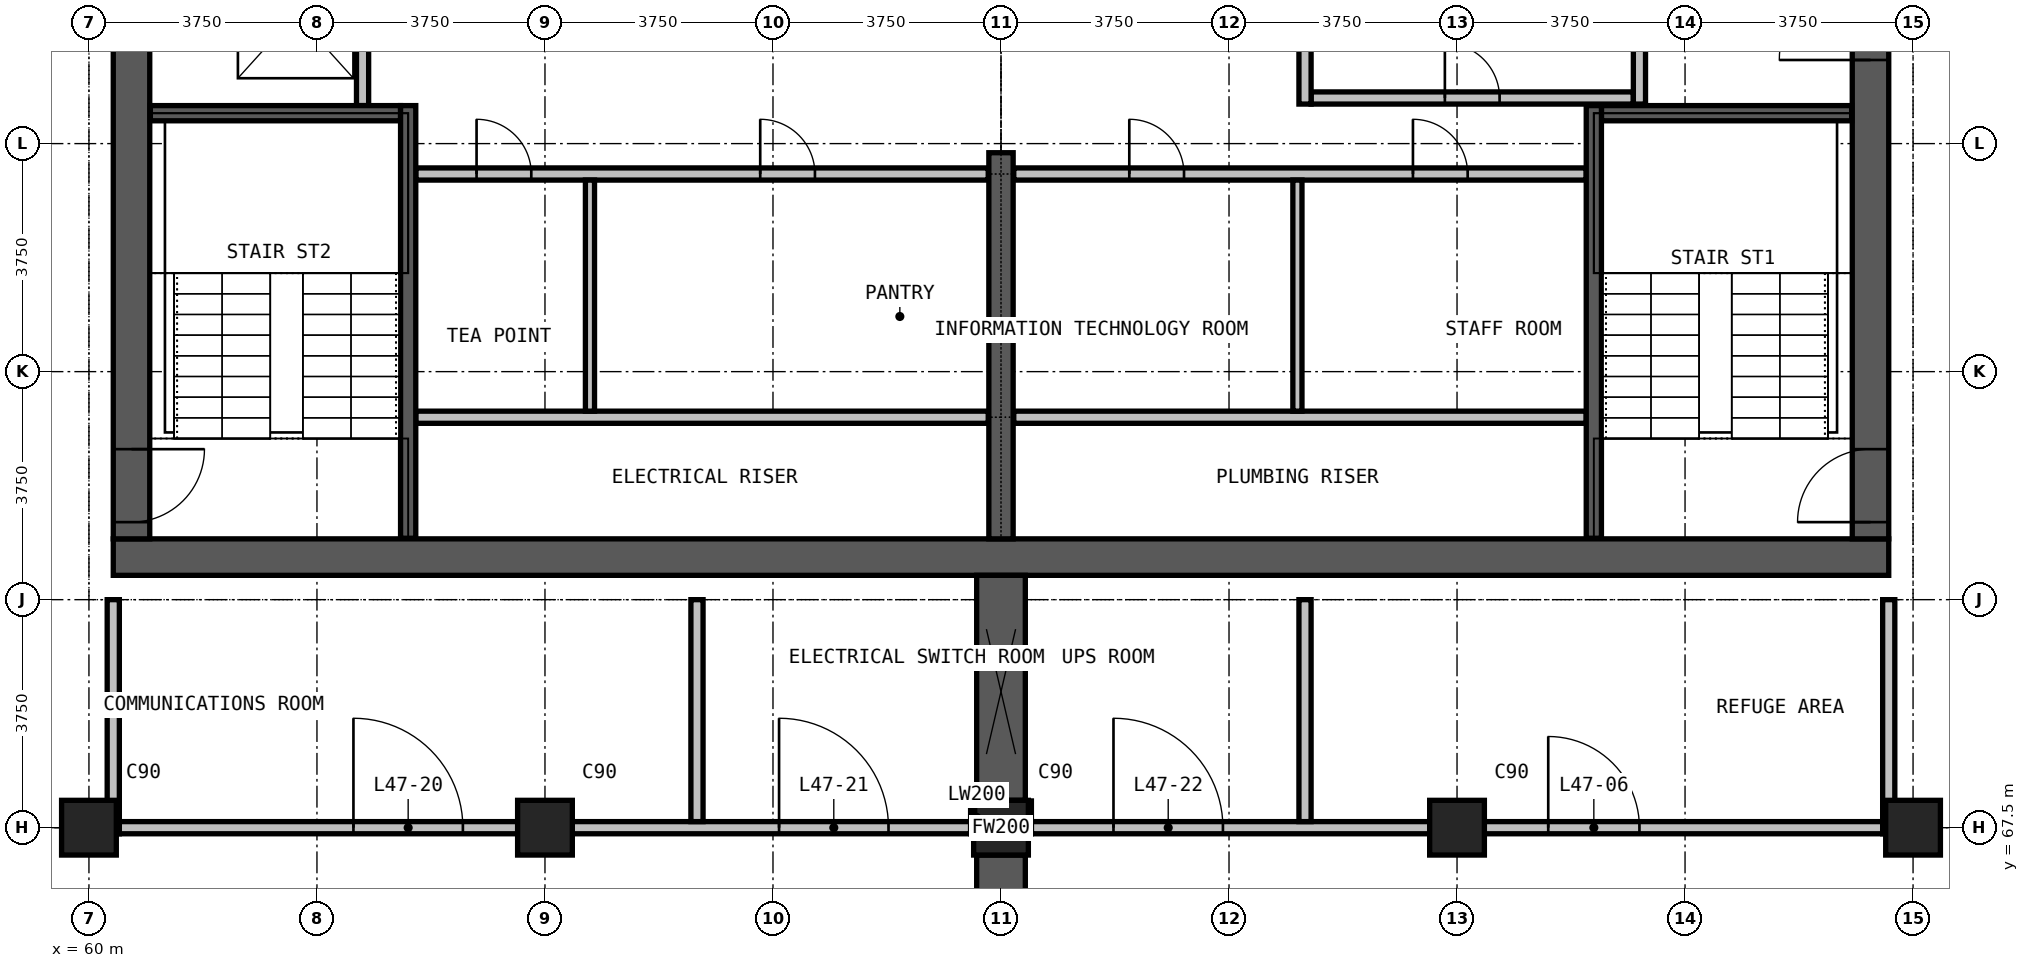
"""IFC4 building model, lengths in metres.
Left out: names, types, materials, properties, quantities, classifications, styles, units other than length and angle.
Written with IfcOpenShell. Run it as: python <this file> out.ifc"""

import sys

from ifc_helpers import new_model, si_unit, direction, frame, frame_2d, origin, origin_2d, place, context, subcontext, project, spatial, rectangle, extrude, element, fill, save


model = new_model("IFC4")
c1 = context("Model", 3, precision=1e-05, world=origin(), true_north=direction((0.0, 1.0)))
c2 = subcontext(c1, "Body", "Model", "MODEL_VIEW")
j1 = project(units=[si_unit("LENGTHUNIT", "METRE"), si_unit("PLANEANGLEUNIT", "RADIAN")], contexts=[c1])
p1 = place(None, origin())
s1 = spatial("IfcSite", under=j1, at=p1, CompositionType="ELEMENT")
p2 = place(p1, origin())
s2 = spatial("IfcBuilding", under=s1, at=p2, CompositionType="ELEMENT")
p3 = place(p2, frame((0.0, 0.0, 183.7)))
s3 = spatial("IfcBuildingStorey", under=s2, at=p3, CompositionType="ELEMENT", Elevation=183.7)
for number, where, z_axis, x_axis in (
    (1, (60.0, 67.5, 0.0), (0.0, 0.0, 1.0), (1.0, 0.0, 0.0)),
    (2, (67.5, 67.5, 0.0), (0.0, 0.0, 1.0), (1.0, 0.0, 0.0)),
    (3, (75.0, 67.5, 0.0), (0.0, 0.0, 1.0), (1.0, 0.0, 0.0)),
    (4, (82.5, 67.5, 0.0), (0.0, 0.0, 1.0), (1.0, 0.0, 0.0)),
    (5, (90.0, 67.5, 0.0), (0.0, 0.0, 1.0), (1.0, 0.0, 0.0)),
):
    element("IfcColumn", number, at=place(p3, frame(where, z_axis=z_axis, x_axis=x_axis)), inside=s3, PredefinedType="COLUMN", context=c2, shape_type="SweptSolid", body=[
        extrude(rectangle(XDim=0.9, YDim=0.9, at=origin_2d()), origin(), (0.0, 0.0, 1.0), 5.0),
    ])
p4 = place(p3, frame((60.4, 71.95, 0.0), z_axis=(0.0, 0.0, 1.0), x_axis=(1.0, 0.0, 0.0)))
e6 = element("IfcWall", 6, at=p4, inside=s3, PredefinedType="SHEAR", context=c2, shape_type="SweptSolid", body=[
    extrude(rectangle(XDim=29.2, YDim=0.6, at=frame_2d((14.6, 0.0))), origin(), (0.0, 0.0, 1.0), 5.0),
])
p5 = place(p3, frame((89.3, 72.25, 0.0), z_axis=(0.0, 0.0, 1.0), x_axis=(0.0, 1.0, 0.0)))
e7 = element("IfcWall", 7, at=p5, inside=s3, PredefinedType="SHEAR", context=c2, shape_type="SweptSolid", body=[
    extrude(rectangle(XDim=20.5, YDim=0.6, at=frame_2d((10.25, 0.0))), origin(), (0.0, 0.0, 1.0), 5.0),
])
p6 = place(p5, frame((0.275, 0.0, 0.0)))
e8 = element("IfcOpeningElement", 8, at=p6, cuts=e7, PredefinedType="OPENING", context=c2, shape_type="SweptSolid", body=[
    extrude(rectangle(XDim=1.2, YDim=2.2, at=frame_2d((0.6, 1.1))), frame((0.0, 0.31, 0.0), z_axis=(0.0, -1.0, 0.0), x_axis=(1.0, 0.0, 0.0)), (0.0, 0.0, 1.0), 0.62),
])
p7 = place(p5, frame((13.775, 0.0, 0.0)))
e9 = element("IfcOpeningElement", 9, at=p7, cuts=e7, PredefinedType="OPENING", context=c2, shape_type="SweptSolid", body=[
    extrude(rectangle(XDim=1.2, YDim=2.2, at=frame_2d((0.6, 1.1))), frame((0.0, 0.31, 0.0), z_axis=(0.0, -1.0, 0.0), x_axis=(1.0, 0.0, 0.0)), (0.0, 0.0, 1.0), 0.62),
])
p8 = place(p5, frame((7.875, 0.0, 0.0)))
e10 = element("IfcOpeningElement", 10, at=p8, cuts=e7, PredefinedType="OPENING", context=c2, shape_type="SweptSolid", body=[
    extrude(rectangle(XDim=1.5, YDim=2.2, at=frame_2d((0.75, 1.1))), frame((0.0, 0.31, 0.0), z_axis=(0.0, -1.0, 0.0), x_axis=(1.0, 0.0, 0.0)), (0.0, 0.0, 1.0), 0.62),
])
p9 = place(p3, frame((60.7, 92.75, 0.0), z_axis=(0.0, 0.0, 1.0), x_axis=(0.0, -1.0, 0.0)))
e11 = element("IfcWall", 11, at=p9, inside=s3, PredefinedType="SHEAR", context=c2, shape_type="SweptSolid", body=[
    extrude(rectangle(XDim=20.5, YDim=0.6, at=frame_2d((10.25, 0.0))), origin(), (0.0, 0.0, 1.0), 5.0),
])
p10 = place(p9, frame((19.025, 0.0, 0.0)))
e12 = element("IfcOpeningElement", 12, at=p10, cuts=e11, PredefinedType="OPENING", context=c2, shape_type="SweptSolid", body=[
    extrude(rectangle(XDim=1.2, YDim=2.2, at=frame_2d((0.6, 1.1))), frame((0.0, 0.31, 0.0), z_axis=(0.0, -1.0, 0.0), x_axis=(1.0, 0.0, 0.0)), (0.0, 0.0, 1.0), 0.62),
])
p11 = place(p9, frame((8.025, 0.0, 0.0)))
e13 = element("IfcOpeningElement", 13, at=p11, cuts=e11, PredefinedType="OPENING", context=c2, shape_type="SweptSolid", body=[
    extrude(rectangle(XDim=1.2, YDim=2.2, at=frame_2d((0.6, 1.1))), frame((0.0, 0.31, 0.0), z_axis=(0.0, -1.0, 0.0), x_axis=(1.0, 0.0, 0.0)), (0.0, 0.0, 1.0), 0.62),
])
p12 = place(p3, frame((75.0, 72.25, 0.0), z_axis=(0.0, 0.0, 1.0), x_axis=(0.0, 1.0, 0.0)))
e14 = element("IfcWall", 14, at=p12, inside=s3, PredefinedType="SHEAR", context=c2, shape_type="SweptSolid", body=[
    extrude(rectangle(XDim=6.35, YDim=0.4, at=frame_2d((3.175, 0.0))), origin(), (0.0, 0.0, 1.0), 5.0),
])
p13 = place(p3, frame((75.0, 60.45, 0.0), z_axis=(0.0, 0.0, 1.0), x_axis=(0.0, 1.0, 0.0)))
e15 = element("IfcWall", 15, at=p13, inside=s3, PredefinedType="SHEAR", context=c2, shape_type="SweptSolid", body=[
    extrude(rectangle(XDim=6.6, YDim=0.8, at=frame_2d((3.3, 0.0))), origin(), (0.0, 0.0, 1.0), 4.7),
])
p14 = place(p3, frame((75.0, 67.95, 0.0), z_axis=(0.0, 0.0, 1.0), x_axis=(0.0, 1.0, 0.0)))
e16 = element("IfcWall", 16, at=p14, inside=s3, PredefinedType="SHEAR", context=c2, shape_type="SweptSolid", body=[
    extrude(rectangle(XDim=3.7, YDim=0.8, at=frame_2d((1.85, 0.0))), origin(), (0.0, 0.0, 1.0), 4.7),
])
p15 = place(p3, frame((60.5, 67.5, 0.0), z_axis=(0.0, 0.0, 1.0), x_axis=(1.0, 0.0, 0.0)))
e17 = element("IfcWall", 17, at=p15, inside=s3, PredefinedType="PARTITIONING", context=c2, shape_type="SweptSolid", body=[
    extrude(rectangle(XDim=14.0, YDim=0.2, at=frame_2d((7.0, 0.0))), origin(), (0.0, 0.0, 1.0), 4.7),
])
p16 = place(p15, frame((3.85, 0.0, 0.0)))
e18 = element("IfcOpeningElement", 18, at=p16, cuts=e17, PredefinedType="OPENING", context=c2, shape_type="SweptSolid", body=[
    extrude(rectangle(XDim=1.8, YDim=2.4, at=frame_2d((0.9, 1.2))), frame((0.0, 0.11, 0.0), z_axis=(0.0, -1.0, 0.0), x_axis=(1.0, 0.0, 0.0)), (0.0, 0.0, 1.0), 0.22),
])
p17 = place(p15, frame((10.85, 0.0, 0.0)))
e19 = element("IfcOpeningElement", 19, at=p17, cuts=e17, PredefinedType="OPENING", context=c2, shape_type="SweptSolid", body=[
    extrude(rectangle(XDim=1.8, YDim=2.4, at=frame_2d((0.9, 1.2))), frame((0.0, 0.11, 0.0), z_axis=(0.0, -1.0, 0.0), x_axis=(1.0, 0.0, 0.0)), (0.0, 0.0, 1.0), 0.22),
])
p18 = place(p3, frame((75.5, 67.5, 0.0), z_axis=(0.0, 0.0, 1.0), x_axis=(1.0, 0.0, 0.0)))
e20 = element("IfcWall", 20, at=p18, inside=s3, PredefinedType="PARTITIONING", context=c2, shape_type="SweptSolid", body=[
    extrude(rectangle(XDim=14.0, YDim=0.2, at=frame_2d((7.0, 0.0))), origin(), (0.0, 0.0, 1.0), 4.7),
])
p19 = place(p18, frame((8.5, 0.0, 0.0)))
e21 = element("IfcOpeningElement", 21, at=p19, cuts=e20, PredefinedType="OPENING", context=c2, shape_type="SweptSolid", body=[
    extrude(rectangle(XDim=1.5, YDim=2.2, at=frame_2d((0.75, 1.1))), frame((0.0, 0.11, 0.0), z_axis=(0.0, -1.0, 0.0), x_axis=(1.0, 0.0, 0.0)), (0.0, 0.0, 1.0), 0.22),
])
p20 = place(p18, frame((1.35, 0.0, 0.0)))
e22 = element("IfcOpeningElement", 22, at=p20, cuts=e20, PredefinedType="OPENING", context=c2, shape_type="SweptSolid", body=[
    extrude(rectangle(XDim=1.8, YDim=2.4, at=frame_2d((0.9, 1.2))), frame((0.0, 0.11, 0.0), z_axis=(0.0, -1.0, 0.0), x_axis=(1.0, 0.0, 0.0)), (0.0, 0.0, 1.0), 0.22),
])
for number, where, z_axis, x_axis in (
    (23, (65.375, 74.25, 0.0), (0.0, 0.0, 1.0), (1.0, 0.0, 0.0)),
    (24, (75.21, 74.25, 0.0), (0.0, 0.0, 1.0), (1.0, 0.0, 0.0)),
):
    element("IfcWall", number, at=place(p3, frame(where, z_axis=z_axis, x_axis=x_axis)), inside=s3, PredefinedType="PARTITIONING", context=c2, shape_type="SweptSolid", body=[
        extrude(rectangle(XDim=9.415, YDim=0.2, at=frame_2d((4.708, 0.0))), origin(), (0.0, 0.0, 1.0), 4.7),
    ])
p21 = place(p3, frame((65.375, 78.25, 0.0), z_axis=(0.0, 0.0, 1.0), x_axis=(1.0, 0.0, 0.0)))
e25 = element("IfcWall", 25, at=p21, inside=s3, PredefinedType="PARTITIONING", context=c2, shape_type="SweptSolid", body=[
    extrude(rectangle(XDim=9.415, YDim=0.2, at=frame_2d((4.708, 0.0))), origin(), (0.0, 0.0, 1.0), 4.7),
])
p22 = place(p21, frame((1.0, 0.0, 0.0)))
e26 = element("IfcOpeningElement", 26, at=p22, cuts=e25, PredefinedType="OPENING", context=c2, shape_type="SweptSolid", body=[
    extrude(rectangle(XDim=0.9, YDim=2.2, at=frame_2d((0.45, 1.1))), frame((0.0, 0.11, 0.0), z_axis=(0.0, -1.0, 0.0), x_axis=(1.0, 0.0, 0.0)), (0.0, 0.0, 1.0), 0.22),
])
p23 = place(p21, frame((5.665, 0.0, 0.0)))
e27 = element("IfcOpeningElement", 27, at=p23, cuts=e25, PredefinedType="OPENING", context=c2, shape_type="SweptSolid", body=[
    extrude(rectangle(XDim=0.9, YDim=2.2, at=frame_2d((0.45, 1.1))), frame((0.0, 0.11, 0.0), z_axis=(0.0, -1.0, 0.0), x_axis=(1.0, 0.0, 0.0)), (0.0, 0.0, 1.0), 0.22),
])
p24 = place(p3, frame((75.21, 78.25, 0.0), z_axis=(0.0, 0.0, 1.0), x_axis=(1.0, 0.0, 0.0)))
e28 = element("IfcWall", 28, at=p24, inside=s3, PredefinedType="PARTITIONING", context=c2, shape_type="SweptSolid", body=[
    extrude(rectangle(XDim=9.415, YDim=0.2, at=frame_2d((4.708, 0.0))), origin(), (0.0, 0.0, 1.0), 4.7),
])
p25 = place(p24, frame((1.9, 0.0, 0.0)))
e29 = element("IfcOpeningElement", 29, at=p25, cuts=e28, PredefinedType="OPENING", context=c2, shape_type="SweptSolid", body=[
    extrude(rectangle(XDim=0.9, YDim=2.2, at=frame_2d((0.45, 1.1))), frame((0.0, 0.11, 0.0), z_axis=(0.0, -1.0, 0.0), x_axis=(1.0, 0.0, 0.0)), (0.0, 0.0, 1.0), 0.22),
])
p26 = place(p24, frame((6.565, 0.0, 0.0)))
e30 = element("IfcOpeningElement", 30, at=p26, cuts=e28, PredefinedType="OPENING", context=c2, shape_type="SweptSolid", body=[
    extrude(rectangle(XDim=0.9, YDim=2.2, at=frame_2d((0.45, 1.1))), frame((0.0, 0.11, 0.0), z_axis=(0.0, -1.0, 0.0), x_axis=(1.0, 0.0, 0.0)), (0.0, 0.0, 1.0), 0.22),
])
p27 = place(p3, frame((80.1, 79.5, 0.0), z_axis=(0.0, 0.0, 1.0), x_axis=(1.0, 0.0, 0.0)))
e31 = element("IfcWall", 31, at=p27, inside=s3, PredefinedType="PARTITIONING", context=c2, shape_type="SweptSolid", body=[
    extrude(rectangle(XDim=5.3, YDim=0.2, at=frame_2d((2.65, 0.0))), origin(), (0.0, 0.0, 1.0), 4.7),
])
p28 = place(p27, frame((2.2, 0.0, 0.0)))
e32 = element("IfcOpeningElement", 32, at=p28, cuts=e31, PredefinedType="OPENING", context=c2, shape_type="SweptSolid", body=[
    extrude(rectangle(XDim=0.9, YDim=2.2, at=frame_2d((0.45, 1.1))), frame((0.0, 0.11, 0.0), z_axis=(0.0, -1.0, 0.0), x_axis=(1.0, 0.0, 0.0)), (0.0, 0.0, 1.0), 0.22),
])
p29 = place(p3, frame((60.4, 67.4, 0.0), z_axis=(0.0, 0.0, 1.0), x_axis=(0.0, 1.0, 0.0)))
e33 = element("IfcWall", 33, at=p29, inside=s3, PredefinedType="PARTITIONING", context=c2, shape_type="SweptSolid", body=[
    extrude(rectangle(XDim=3.85, YDim=0.2, at=frame_2d((1.925, 0.0))), origin(), (0.0, 0.0, 1.0), 4.7),
])
p30 = place(p3, frame((70.0, 67.6, 0.0), z_axis=(0.0, 0.0, 1.0), x_axis=(0.0, 1.0, 0.0)))
e34 = element("IfcWall", 34, at=p30, inside=s3, PredefinedType="PARTITIONING", context=c2, shape_type="SweptSolid", body=[
    extrude(rectangle(XDim=3.65, YDim=0.2, at=frame_2d((1.825, 0.0))), origin(), (0.0, 0.0, 1.0), 4.7),
])
for number, where, z_axis, x_axis in (
    (35, (74.6, 67.4, 0.0), (0.0, 0.0, 1.0), (0.0, 1.0, 0.0)),
    (36, (75.4, 67.4, 0.0), (0.0, 0.0, 1.0), (0.0, 1.0, 0.0)),
):
    element("IfcWall", number, at=place(p3, frame(where, z_axis=z_axis, x_axis=x_axis)), inside=s3, PredefinedType="PARTITIONING", context=c2, shape_type="SweptSolid", body=[
        extrude(rectangle(XDim=0.54, YDim=0.2, at=frame_2d((0.27, 0.0))), origin(), (0.0, 0.0, 1.0), 4.7),
    ])
p31 = place(p3, frame((80.0, 67.6, 0.0), z_axis=(0.0, 0.0, 1.0), x_axis=(0.0, 1.0, 0.0)))
e37 = element("IfcWall", 37, at=p31, inside=s3, PredefinedType="PARTITIONING", context=c2, shape_type="SweptSolid", body=[
    extrude(rectangle(XDim=3.65, YDim=0.2, at=frame_2d((1.825, 0.0))), origin(), (0.0, 0.0, 1.0), 4.7),
])
for number, where, z_axis, x_axis in (
    (38, (80.0, 79.4, 0.0), (0.0, 0.0, 1.0), (0.0, 1.0, 0.0)),
    (39, (85.5, 79.4, 0.0), (0.0, 0.0, 1.0), (0.0, 1.0, 0.0)),
):
    element("IfcWall", number, at=place(p3, frame(where, z_axis=z_axis, x_axis=x_axis)), inside=s3, PredefinedType="PARTITIONING", context=c2, shape_type="SweptSolid", body=[
        extrude(rectangle(XDim=2.89, YDim=0.2, at=frame_2d((1.445, 0.0))), origin(), (0.0, 0.0, 1.0), 4.7),
    ])
p32 = place(p3, frame((89.6, 67.4, 0.0), z_axis=(0.0, 0.0, 1.0), x_axis=(0.0, 1.0, 0.0)))
e40 = element("IfcWall", 40, at=p32, inside=s3, PredefinedType="PARTITIONING", context=c2, shape_type="SweptSolid", body=[
    extrude(rectangle(XDim=3.85, YDim=0.2, at=frame_2d((1.925, 0.0))), origin(), (0.0, 0.0, 1.0), 4.7),
])
p33 = place(p3, frame((74.7, 67.5, 0.0), z_axis=(0.0, 0.0, 1.0), x_axis=(1.0, 0.0, 0.0)))
e41 = element("IfcWall", 41, at=p33, inside=s3, PredefinedType="PARTITIONING", context=c2, shape_type="SweptSolid", body=[
    extrude(rectangle(XDim=0.6, YDim=0.2, at=frame_2d((0.3, 0.0))), origin(), (0.0, 0.0, 1.0), 4.7),
])
for number, where, z_axis, x_axis in (
    (42, (68.24, 74.35, 0.0), (0.0, 0.0, 1.0), (0.0, 1.0, 0.0)),
    (43, (79.875, 74.35, 0.0), (0.0, 0.0, 1.0), (0.0, 1.0, 0.0)),
):
    element("IfcWall", number, at=place(p3, frame(where, z_axis=z_axis, x_axis=x_axis)), inside=s3, PredefinedType="PARTITIONING", context=c2, shape_type="SweptSolid", body=[
        extrude(rectangle(XDim=3.8, YDim=0.15, at=frame_2d((1.9, 0.0))), origin(), (0.0, 0.0, 1.0), 4.7),
    ])
p34 = place(p3, frame((64.5, 79.375, 0.0), z_axis=(0.0, 0.0, 1.0), x_axis=(0.0, 1.0, 0.0)))
e44 = element("IfcWall", 44, at=p34, inside=s3, PredefinedType="PARTITIONING", context=c2, shape_type="SweptSolid", body=[
    extrude(rectangle(XDim=2.915, YDim=0.2, at=frame_2d((1.458, 0.0))), origin(), (0.0, 0.0, 1.0), 4.7),
])
for number, where, z_axis, x_axis in (
    (45, (61.01, 79.25, 0.0), (0.0, 0.0, 1.0), (1.0, 0.0, 0.0)),
    (46, (84.875, 79.25, 0.0), (0.0, 0.0, 1.0), (1.0, 0.0, 0.0)),
):
    element("IfcWall", number, at=place(p3, frame(where, z_axis=z_axis, x_axis=x_axis)), inside=s3, PredefinedType="PARTITIONING", context=c2, shape_type="SweptSolid", body=[
        extrude(rectangle(XDim=4.115, YDim=0.25, at=frame_2d((2.058, 0.0))), origin(), (0.0, 0.0, 1.0), 4.7),
    ])
for number, where, z_axis, x_axis in (
    (47, (65.25, 72.26, 0.0), (0.0, 0.0, 1.0), (0.0, 1.0, 0.0)),
    (48, (84.75, 72.26, 0.0), (0.0, 0.0, 1.0), (0.0, 1.0, 0.0)),
):
    element("IfcWall", number, at=place(p3, frame(where, z_axis=z_axis, x_axis=x_axis)), inside=s3, PredefinedType="PARTITIONING", context=c2, shape_type="SweptSolid", body=[
        extrude(rectangle(XDim=7.115, YDim=0.25, at=frame_2d((3.558, 0.0))), origin(), (0.0, 0.0, 1.0), 4.7),
    ])
p35 = place(p6, origin())
e49 = element("IfcDoor", 49, at=p35, inside=s3, OperationType="SINGLE_SWING_LEFT", PredefinedType="DOOR", context=c2, shape_type="SweptSolid", body=[
    extrude(rectangle(XDim=1.2, YDim=2.2, at=frame_2d((0.6, 1.1))), frame((0.0, 0.025, 0.0), z_axis=(0.0, -1.0, 0.0), x_axis=(1.0, 0.0, 0.0)), (0.0, 0.0, 1.0), 0.05),
])
fill(e8, e49)
p36 = place(p10, origin())
e50 = element("IfcDoor", 50, at=p36, inside=s3, OperationType="SINGLE_SWING_RIGHT", PredefinedType="DOOR", context=c2, shape_type="SweptSolid", body=[
    extrude(rectangle(XDim=1.2, YDim=2.2, at=frame_2d((0.6, 1.1))), frame((0.0, 0.025, 0.0), z_axis=(0.0, -1.0, 0.0), x_axis=(1.0, 0.0, 0.0)), (0.0, 0.0, 1.0), 0.05),
])
fill(e12, e50)
p37 = place(p19, origin())
e51 = element("IfcDoor", 51, at=p37, inside=s3, OperationType="DOUBLE_DOOR_SINGLE_SWING", PredefinedType="DOOR", context=c2, shape_type="SweptSolid", body=[
    extrude(rectangle(XDim=1.5, YDim=2.2, at=frame_2d((0.75, 1.1))), frame((0.0, 0.025, 0.0), z_axis=(0.0, -1.0, 0.0), x_axis=(1.0, 0.0, 0.0)), (0.0, 0.0, 1.0), 0.05),
])
fill(e21, e51)
p38 = place(p8, origin())
e52 = element("IfcDoor", 52, at=p38, inside=s3, OperationType="DOUBLE_DOOR_SINGLE_SWING", PredefinedType="DOOR", context=c2, shape_type="SweptSolid", body=[
    extrude(rectangle(XDim=1.5, YDim=2.2, at=frame_2d((0.75, 1.1))), frame((0.0, 0.025, 0.0), z_axis=(0.0, -1.0, 0.0), x_axis=(1.0, 0.0, 0.0)), (0.0, 0.0, 1.0), 0.05),
])
fill(e10, e52)
p39 = place(p28, origin())
e53 = element("IfcDoor", 53, at=p39, inside=s3, OperationType="SINGLE_SWING_LEFT", PredefinedType="DOOR", context=c2, shape_type="SweptSolid", body=[
    extrude(rectangle(XDim=0.9, YDim=2.2, at=frame_2d((0.45, 1.1))), frame((0.0, 0.025, 0.0), z_axis=(0.0, -1.0, 0.0), x_axis=(1.0, 0.0, 0.0)), (0.0, 0.0, 1.0), 0.05),
])
fill(e32, e53)
p40 = place(p22, origin())
e54 = element("IfcDoor", 54, at=p40, inside=s3, OperationType="SINGLE_SWING_LEFT", PredefinedType="DOOR", context=c2, shape_type="SweptSolid", body=[
    extrude(rectangle(XDim=0.9, YDim=2.2, at=frame_2d((0.45, 1.1))), frame((0.0, 0.025, 0.0), z_axis=(0.0, -1.0, 0.0), x_axis=(1.0, 0.0, 0.0)), (0.0, 0.0, 1.0), 0.05),
])
fill(e26, e54)
p41 = place(p23, origin())
e55 = element("IfcDoor", 55, at=p41, inside=s3, OperationType="SINGLE_SWING_LEFT", PredefinedType="DOOR", context=c2, shape_type="SweptSolid", body=[
    extrude(rectangle(XDim=0.9, YDim=2.2, at=frame_2d((0.45, 1.1))), frame((0.0, 0.025, 0.0), z_axis=(0.0, -1.0, 0.0), x_axis=(1.0, 0.0, 0.0)), (0.0, 0.0, 1.0), 0.05),
])
fill(e27, e55)
p42 = place(p25, origin())
e56 = element("IfcDoor", 56, at=p42, inside=s3, OperationType="SINGLE_SWING_LEFT", PredefinedType="DOOR", context=c2, shape_type="SweptSolid", body=[
    extrude(rectangle(XDim=0.9, YDim=2.2, at=frame_2d((0.45, 1.1))), frame((0.0, 0.025, 0.0), z_axis=(0.0, -1.0, 0.0), x_axis=(1.0, 0.0, 0.0)), (0.0, 0.0, 1.0), 0.05),
])
fill(e29, e56)
p43 = place(p26, origin())
e57 = element("IfcDoor", 57, at=p43, inside=s3, OperationType="SINGLE_SWING_LEFT", PredefinedType="DOOR", context=c2, shape_type="SweptSolid", body=[
    extrude(rectangle(XDim=0.9, YDim=2.2, at=frame_2d((0.45, 1.1))), frame((0.0, 0.025, 0.0), z_axis=(0.0, -1.0, 0.0), x_axis=(1.0, 0.0, 0.0)), (0.0, 0.0, 1.0), 0.05),
])
fill(e30, e57)
p44 = place(p16, origin())
e58 = element("IfcDoor", 58, at=p44, inside=s3, OperationType="DOUBLE_DOOR_SINGLE_SWING", PredefinedType="DOOR", context=c2, shape_type="SweptSolid", body=[
    extrude(rectangle(XDim=1.8, YDim=2.4, at=frame_2d((0.9, 1.2))), frame((0.0, 0.025, 0.0), z_axis=(0.0, -1.0, 0.0), x_axis=(1.0, 0.0, 0.0)), (0.0, 0.0, 1.0), 0.05),
])
fill(e18, e58)
p45 = place(p17, origin())
e59 = element("IfcDoor", 59, at=p45, inside=s3, OperationType="DOUBLE_DOOR_SINGLE_SWING", PredefinedType="DOOR", context=c2, shape_type="SweptSolid", body=[
    extrude(rectangle(XDim=1.8, YDim=2.4, at=frame_2d((0.9, 1.2))), frame((0.0, 0.025, 0.0), z_axis=(0.0, -1.0, 0.0), x_axis=(1.0, 0.0, 0.0)), (0.0, 0.0, 1.0), 0.05),
])
fill(e19, e59)
p46 = place(p20, origin())
e60 = element("IfcDoor", 60, at=p46, inside=s3, OperationType="DOUBLE_DOOR_SINGLE_SWING", PredefinedType="DOOR", context=c2, shape_type="SweptSolid", body=[
    extrude(rectangle(XDim=1.8, YDim=2.4, at=frame_2d((0.9, 1.2))), frame((0.0, 0.025, 0.0), z_axis=(0.0, -1.0, 0.0), x_axis=(1.0, 0.0, 0.0)), (0.0, 0.0, 1.0), 0.05),
])
fill(e22, e60)
save(model, sys.argv[1])
